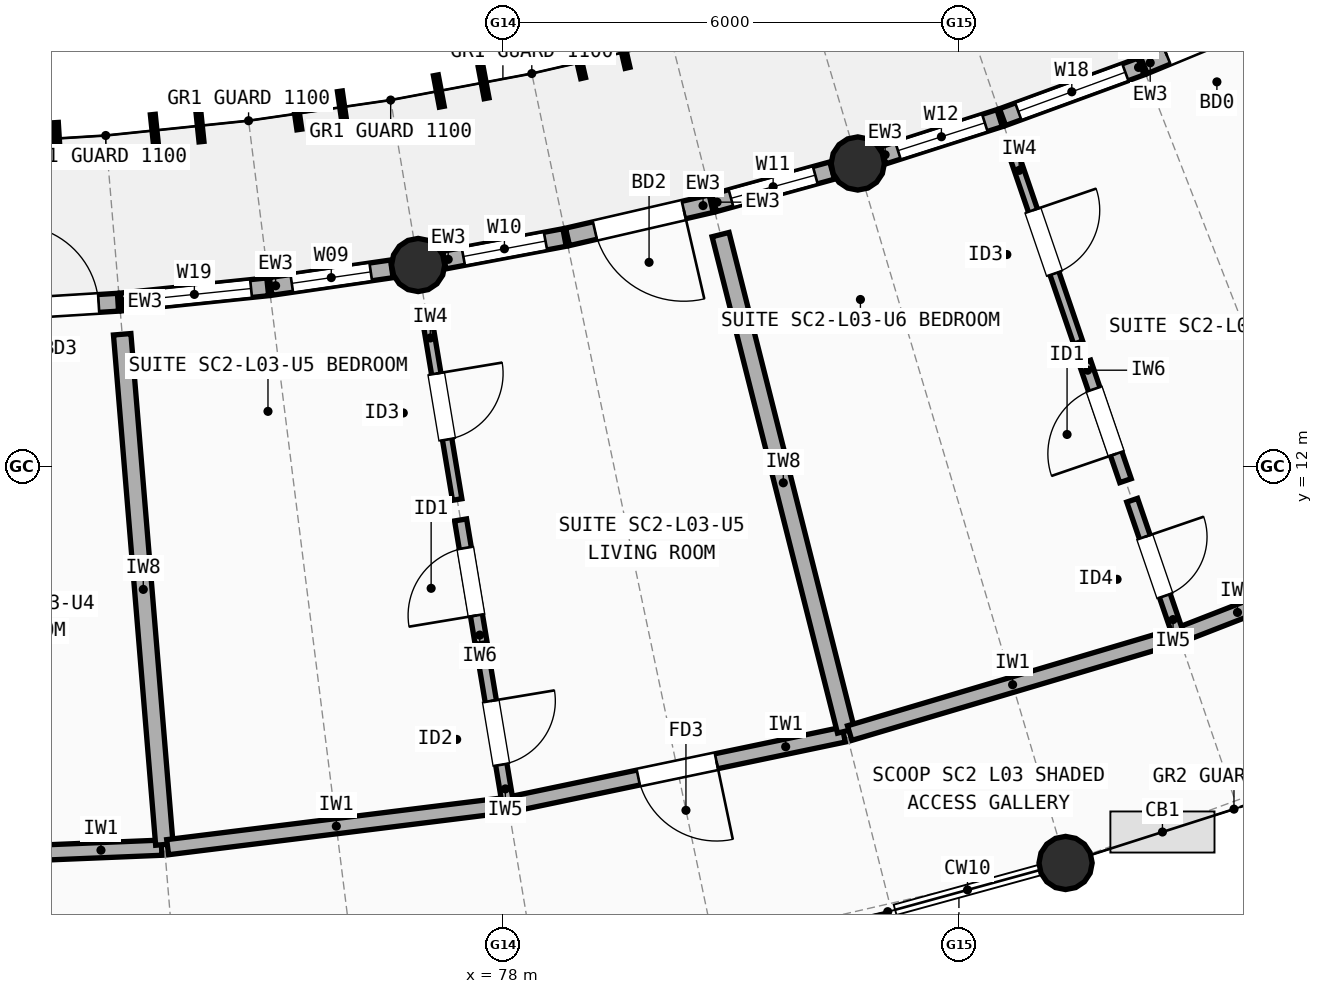
"""IFC4 building model, lengths in metres.
Left out: names, types, materials, properties, quantities, classifications, styles, units other than length and angle.
Written with IfcOpenShell. Run it as: python <this file> out.ifc"""

import sys

from ifc_helpers import new_model, si_unit, direction, frame, frame_2d, origin, origin_2d, place, context, subcontext, project, spatial, rectangle, circle, extrude, element, fill, save


model = new_model("IFC4")
c1 = context("Model", 3, precision=1e-05, world=origin(), true_north=direction((0.0, 1.0)))
c2 = subcontext(c1, "Body", "Model", "MODEL_VIEW")
j1 = project(units=[si_unit("LENGTHUNIT", "METRE"), si_unit("PLANEANGLEUNIT", "RADIAN")], contexts=[c1])
p1 = place(None, origin())
s1 = spatial("IfcSite", under=j1, at=p1, CompositionType="ELEMENT")
p2 = place(p1, origin())
s2 = spatial("IfcBuilding", under=s1, at=p2, CompositionType="ELEMENT")
p3 = place(p2, frame((0.0, 0.0, 10.9)))
s3 = spatial("IfcBuildingStorey", under=s2, at=p3, CompositionType="ELEMENT", Elevation=10.9)
for number, where, z_axis, x_axis in (
    (1, (76.885, 14.652, 0.0), (0.0, 0.0, 1.0), (1.0, 0.0, 0.0)),
    (2, (82.669, 15.988, 0.0), (0.0, 0.0, 1.0), (1.0, 0.0, 0.0)),
    (3, (85.403, 6.785, 0.0), (0.0, 0.0, 1.0), (1.0, 0.0, 0.0)),
):
    element("IfcColumn", number, at=place(p3, frame(where, z_axis=z_axis, x_axis=x_axis)), inside=s3, PredefinedType="COLUMN", context=c2, shape_type="SweptSolid", body=[
        extrude(circle(Radius=0.35, at=origin_2d()), origin(), (0.0, 0.0, 1.0), 2.948),
    ])
p4 = place(p3, frame((71.329, 14.062, 0.0), z_axis=(0.0, 0.0, 1.0), x_axis=(0.998084310064, 0.061868489594, 0.0)))
e4 = element("IfcWall", 4, at=p4, inside=s3, PredefinedType="STANDARD", context=c2, shape_type="SweptSolid", body=[
    extrude(rectangle(XDim=1.61, YDim=0.235, at=frame_2d((0.805, 0.0))), origin(), (0.0, 0.0, 1.0), 2.684),
])
p5 = place(p4, frame((0.255, 0.0, 0.0)))
e5 = element("IfcOpeningElement", 5, at=p5, cuts=e4, PredefinedType="OPENING", context=c2, shape_type="SweptSolid", body=[
    extrude(rectangle(XDim=1.1, YDim=2.15, at=frame_2d((0.55, 1.075))), frame((0.0, 0.127, 0.0), z_axis=(0.0, -1.0, 0.0), x_axis=(1.0, 0.0, 0.0)), (0.0, 0.0, 1.0), 0.255),
])
p6 = place(p3, frame((72.976, 14.165, 0.0), z_axis=(0.0, 0.0, 1.0), x_axis=(0.994688684624, 0.10292920228, 0.0)))
e6 = element("IfcWall", 6, at=p6, inside=s3, PredefinedType="STANDARD", context=c2, shape_type="SweptSolid", body=[
    extrude(rectangle(XDim=1.94, YDim=0.235, at=frame_2d((0.97, 0.0))), origin(), (0.0, 0.0, 1.0), 2.684),
])
p7 = place(p6, frame((0.22, 0.0, 0.85)))
e7 = element("IfcOpeningElement", 7, at=p7, cuts=e6, PredefinedType="OPENING", context=c2, shape_type="SweptSolid", body=[
    extrude(rectangle(XDim=1.5, YDim=1.5, at=frame_2d((0.75, 0.75))), frame((0.0, 0.127, 0.0), z_axis=(0.0, -1.0, 0.0), x_axis=(1.0, 0.0, 0.0)), (0.0, 0.0, 1.0), 0.255),
])
p8 = place(p3, frame((74.945, 14.37, 0.0), z_axis=(0.0, 0.0, 1.0), x_axis=(0.98961312767, 0.143756243492, 0.0)))
e8 = element("IfcWall", 8, at=p8, inside=s3, PredefinedType="STANDARD", context=c2, shape_type="SweptSolid", body=[
    extrude(rectangle(XDim=1.61, YDim=0.235, at=frame_2d((0.805, 0.0))), origin(), (0.0, 0.0, 1.0), 2.684),
])
p9 = place(p8, frame((0.28, 0.0, 0.85)))
e9 = element("IfcOpeningElement", 9, at=p9, cuts=e8, PredefinedType="OPENING", context=c2, shape_type="SweptSolid", body=[
    extrude(rectangle(XDim=1.05, YDim=1.35, at=frame_2d((0.525, 0.675))), frame((0.0, 0.127, 0.0), z_axis=(0.0, -1.0, 0.0), x_axis=(1.0, 0.0, 0.0)), (0.0, 0.0, 1.0), 0.255),
])
p10 = place(p3, frame((77.229, 14.717, 0.0), z_axis=(0.0, 0.0, 1.0), x_axis=(0.982794848755, 0.184700528589, 0.0)))
e10 = element("IfcWall", 10, at=p10, inside=s3, PredefinedType="STANDARD", context=c2, shape_type="SweptSolid", body=[
    extrude(rectangle(XDim=1.61, YDim=0.235, at=frame_2d((0.805, 0.0))), origin(), (0.0, 0.0, 1.0), 2.684),
])
p11 = place(p10, frame((0.255, 0.0, 0.85)))
e11 = element("IfcOpeningElement", 11, at=p11, cuts=e10, PredefinedType="OPENING", context=c2, shape_type="SweptSolid", body=[
    extrude(rectangle(XDim=1.1, YDim=1.45, at=frame_2d((0.55, 0.725))), frame((0.0, 0.127, 0.0), z_axis=(0.0, -1.0, 0.0), x_axis=(1.0, 0.0, 0.0)), (0.0, 0.0, 1.0), 0.255),
])
p12 = place(p3, frame((78.85, 15.022, 0.0), z_axis=(0.0, 0.0, 1.0), x_axis=(0.974359373104, 0.224997360081, 0.0)))
e12 = element("IfcWall", 12, at=p12, inside=s3, PredefinedType="STANDARD", context=c2, shape_type="SweptSolid", body=[
    extrude(rectangle(XDim=1.94, YDim=0.235, at=frame_2d((0.97, 0.0))), origin(), (0.0, 0.0, 1.0), 2.684),
])
p13 = place(p12, frame((0.37, 0.0, 0.0)))
e13 = element("IfcOpeningElement", 13, at=p13, cuts=e12, PredefinedType="OPENING", context=c2, shape_type="SweptSolid", body=[
    extrude(rectangle(XDim=1.2, YDim=2.15, at=frame_2d((0.6, 1.075))), frame((0.0, 0.127, 0.0), z_axis=(0.0, -1.0, 0.0), x_axis=(1.0, 0.0, 0.0)), (0.0, 0.0, 1.0), 0.255),
])
p14 = place(p3, frame((80.779, 15.468, 0.0), z_axis=(0.0, 0.0, 1.0), x_axis=(0.96427223836, 0.264913288318, 0.0)))
e14 = element("IfcWall", 14, at=p14, inside=s3, PredefinedType="STANDARD", context=c2, shape_type="SweptSolid", body=[
    extrude(rectangle(XDim=1.61, YDim=0.235, at=frame_2d((0.805, 0.0))), origin(), (0.0, 0.0, 1.0), 2.684),
])
p15 = place(p14, frame((0.23, 0.0, 0.85)))
e15 = element("IfcOpeningElement", 15, at=p15, cuts=e14, PredefinedType="OPENING", context=c2, shape_type="SweptSolid", body=[
    extrude(rectangle(XDim=1.15, YDim=1.45, at=frame_2d((0.575, 0.725))), frame((0.0, 0.127, 0.0), z_axis=(0.0, -1.0, 0.0), x_axis=(1.0, 0.0, 0.0)), (0.0, 0.0, 1.0), 0.255),
])
p16 = place(p3, frame((83.003, 16.094, 0.0), z_axis=(0.0, 0.0, 1.0), x_axis=(0.952508629145, 0.304511594861, 0.0)))
e16 = element("IfcWall", 16, at=p16, inside=s3, PredefinedType="STANDARD", context=c2, shape_type="SweptSolid", body=[
    extrude(rectangle(XDim=1.61, YDim=0.235, at=frame_2d((0.805, 0.0))), origin(), (0.0, 0.0, 1.0), 2.684),
])
p17 = place(p16, frame((0.205, 0.0, 0.85)))
e17 = element("IfcOpeningElement", 17, at=p17, cuts=e16, PredefinedType="OPENING", context=c2, shape_type="SweptSolid", body=[
    extrude(rectangle(XDim=1.2, YDim=1.35, at=frame_2d((0.6, 0.675))), frame((0.0, 0.127, 0.0), z_axis=(0.0, -1.0, 0.0), x_axis=(1.0, 0.0, 0.0)), (0.0, 0.0, 1.0), 0.255),
])
p18 = place(p3, frame((84.574, 16.597, 0.0), z_axis=(0.0, 0.0, 1.0), x_axis=(0.939178301307, 0.343429932235, 0.0)))
e18 = element("IfcWall", 18, at=p18, inside=s3, PredefinedType="STANDARD", context=c2, shape_type="SweptSolid", body=[
    extrude(rectangle(XDim=1.94, YDim=0.235, at=frame_2d((0.97, 0.0))), origin(), (0.0, 0.0, 1.0), 2.684),
])
p19 = place(p18, frame((0.22, 0.0, 0.85)))
e19 = element("IfcOpeningElement", 19, at=p19, cuts=e18, PredefinedType="OPENING", context=c2, shape_type="SweptSolid", body=[
    extrude(rectangle(XDim=1.5, YDim=1.4, at=frame_2d((0.75, 0.7))), frame((0.0, 0.127, 0.0), z_axis=(0.0, -1.0, 0.0), x_axis=(1.0, 0.0, 0.0)), (0.0, 0.0, 1.0), 0.255),
])
p20 = place(p3, frame((86.433, 17.278, 0.0), z_axis=(0.0, 0.0, 1.0), x_axis=(0.924159027547, 0.382007973481, 0.0)))
e20 = element("IfcWall", 20, at=p20, inside=s3, PredefinedType="STANDARD", context=c2, shape_type="SweptSolid", body=[
    extrude(rectangle(XDim=1.61, YDim=0.235, at=frame_2d((0.805, 0.0))), origin(), (0.0, 0.0, 1.0), 2.684),
])
p21 = place(p20, frame((0.33, 0.0, 0.0)))
e21 = element("IfcOpeningElement", 21, at=p21, cuts=e20, PredefinedType="OPENING", context=c2, shape_type="SweptSolid", body=[
    extrude(rectangle(XDim=0.95, YDim=2.12, at=frame_2d((0.475, 1.06))), frame((0.0, 0.127, 0.0), z_axis=(0.0, -1.0, 0.0), x_axis=(1.0, 0.0, 0.0)), (0.0, 0.0, 1.0), 0.255),
])
p22 = place(p3, frame((69.04, 6.802, 0.0), z_axis=(0.0, 0.0, 1.0), x_axis=(0.999148329529, 0.041262762871, 0.0)))
e22 = element("IfcWall", 22, at=p22, inside=s3, PredefinedType="SOLIDWALL", context=c2, shape_type="SweptSolid", body=[
    extrude(rectangle(XDim=4.473, YDim=0.2, at=frame_2d((2.237, 0.0))), origin(), (0.0, 0.0, 1.0), 2.762),
])
p23 = place(p22, frame((1.747, 0.0, 0.0)))
e23 = element("IfcOpeningElement", 23, at=p23, cuts=e22, PredefinedType="OPENING", context=c2, shape_type="SweptSolid", body=[
    extrude(rectangle(XDim=0.98, YDim=2.15, at=frame_2d((0.49, 1.075))), frame((0.0, 0.11, 0.0), z_axis=(0.0, -1.0, 0.0), x_axis=(1.0, 0.0, 0.0)), (0.0, 0.0, 1.0), 0.22),
])
p24 = place(p3, frame((72.991, 13.741, 0.0), z_axis=(0.0, 0.0, 1.0), x_axis=(0.082418569382, -0.996597802236, 0.0)))
e24 = element("IfcWall", 24, at=p24, inside=s3, PredefinedType="SOLIDWALL", context=c2, shape_type="SweptSolid", body=[
    extrude(rectangle(XDim=6.736, YDim=0.23, at=frame_2d((3.368, 0.0))), origin(), (0.0, 0.0, 1.0), 2.722),
])
p25 = place(p3, frame((73.589, 6.993, 0.0), z_axis=(0.0, 0.0, 1.0), x_axis=(0.992349088432, 0.123463705959, 0.0)))
e25 = element("IfcWall", 25, at=p25, inside=s3, PredefinedType="SOLIDWALL", context=c2, shape_type="SweptSolid", body=[
    extrude(rectangle(XDim=4.473, YDim=0.2, at=frame_2d((2.236, 0.0))), origin(), (0.0, 0.0, 1.0), 2.742),
])
p26 = place(p3, frame((78.107, 7.558, 0.0), z_axis=(0.0, 0.0, 1.0), x_axis=(0.978806148413, 0.204788973894, 0.0)))
e26 = element("IfcWall", 26, at=p26, inside=s3, PredefinedType="SOLIDWALL", context=c2, shape_type="SweptSolid", body=[
    extrude(rectangle(XDim=4.473, YDim=0.2, at=frame_2d((2.236, 0.0))), origin(), (0.0, 0.0, 1.0), 2.722),
])
p27 = place(p26, frame((1.711, 0.0, 0.0)))
e27 = element("IfcOpeningElement", 27, at=p27, cuts=e26, PredefinedType="OPENING", context=c2, shape_type="SweptSolid", body=[
    extrude(rectangle(XDim=1.05, YDim=2.15, at=frame_2d((0.525, 1.075))), frame((0.0, 0.11, 0.0), z_axis=(0.0, -1.0, 0.0), x_axis=(1.0, 0.0, 0.0)), (0.0, 0.0, 1.0), 0.22),
])
p28 = place(p3, frame((76.991, 14.013, 0.0), z_axis=(0.0, 0.0, 1.0), x_axis=(0.16420741421, -0.986425833562, 0.0)))
e28 = element("IfcWall", 28, at=p28, inside=s3, PredefinedType="PARTITIONING", context=c2, shape_type="SweptSolid", body=[
    extrude(rectangle(XDim=2.48, YDim=0.125, at=frame_2d((1.24, 0.0))), origin(), (0.0, 0.0, 1.0), 2.762),
])
p29 = place(p28, frame((0.8, 0.0, 0.0)))
e29 = element("IfcOpeningElement", 29, at=p29, cuts=e28, PredefinedType="OPENING", context=c2, shape_type="SweptSolid", body=[
    extrude(rectangle(XDim=0.88, YDim=2.1, at=frame_2d((0.44, 1.05))), frame((0.0, 0.073, 0.0), z_axis=(0.0, -1.0, 0.0), x_axis=(1.0, 0.0, 0.0)), (0.0, 0.0, 1.0), 0.145),
])
p30 = place(p3, frame((77.443, 11.298, 0.0), z_axis=(0.0, 0.0, 1.0), x_axis=(0.164158726706, -0.986433937193, 0.0)))
e30 = element("IfcWall", 30, at=p30, inside=s3, PredefinedType="PLUMBINGWALL", context=c2, shape_type="SweptSolid", body=[
    extrude(rectangle(XDim=1.648, YDim=0.16, at=frame_2d((0.824, 0.0))), origin(), (0.0, 0.0, 1.0), 2.762),
])
p31 = place(p30, frame((0.374, 0.0, 0.0)))
e31 = element("IfcOpeningElement", 31, at=p31, cuts=e30, PredefinedType="OPENING", context=c2, shape_type="SweptSolid", body=[
    extrude(rectangle(XDim=0.9, YDim=2.1, at=frame_2d((0.45, 1.05))), frame((0.0, 0.09, 0.0), z_axis=(0.0, -1.0, 0.0), x_axis=(1.0, 0.0, 0.0)), (0.0, 0.0, 1.0), 0.18),
])
p32 = place(p3, frame((77.759, 9.404, 0.0), z_axis=(0.0, 0.0, 1.0), x_axis=(0.164269882379, -0.986415432636, 0.0)))
e32 = element("IfcWall", 32, at=p32, inside=s3, PredefinedType="PARTITIONING", context=c2, shape_type="SweptSolid", body=[
    extrude(rectangle(XDim=1.84, YDim=0.15, at=frame_2d((0.92, 0.0))), origin(), (0.0, 0.0, 1.0), 2.762),
])
p33 = place(p32, frame((0.495, 0.0, 0.0)))
e33 = element("IfcOpeningElement", 33, at=p33, cuts=e32, PredefinedType="OPENING", context=c2, shape_type="SweptSolid", body=[
    extrude(rectangle(XDim=0.85, YDim=2.1, at=frame_2d((0.425, 1.05))), frame((0.0, 0.085, 0.0), z_axis=(0.0, -1.0, 0.0), x_axis=(1.0, 0.0, 0.0)), (0.0, 0.0, 1.0), 0.17),
])
p34 = place(p3, frame((80.864, 15.052, 0.0), z_axis=(0.0, 0.0, 1.0), x_axis=(0.244982481903, -0.969527505314, 0.0)))
e34 = element("IfcWall", 34, at=p34, inside=s3, PredefinedType="SOLIDWALL", context=c2, shape_type="SweptSolid", body=[
    extrude(rectangle(XDim=6.736, YDim=0.23, at=frame_2d((3.368, 0.0))), origin(), (0.0, 0.0, 1.0), 2.742),
])
p35 = place(p3, frame((82.562, 8.494, 0.0), z_axis=(0.0, 0.0, 1.0), x_axis=(0.958602413557, 0.28474798107, 0.0)))
e35 = element("IfcWall", 35, at=p35, inside=s3, PredefinedType="SOLIDWALL", context=c2, shape_type="SweptSolid", body=[
    extrude(rectangle(XDim=4.473, YDim=0.2, at=frame_2d((2.236, 0.0))), origin(), (0.0, 0.0, 1.0), 2.762),
])
p36 = place(p3, frame((86.926, 9.793, 0.0), z_axis=(0.0, 0.0, 1.0), x_axis=(0.931847867525, 0.362849213571, 0.0)))
e36 = element("IfcWall", 36, at=p36, inside=s3, PredefinedType="SOLIDWALL", context=c2, shape_type="SweptSolid", body=[
    extrude(rectangle(XDim=4.473, YDim=0.2, at=frame_2d((2.237, 0.0))), origin(), (0.0, 0.0, 1.0), 2.742),
])
p37 = place(p36, frame((1.737, 0.0, 0.0)))
e37 = element("IfcOpeningElement", 37, at=p37, cuts=e36, PredefinedType="OPENING", context=c2, shape_type="SweptSolid", body=[
    extrude(rectangle(XDim=1.0, YDim=2.15, at=frame_2d((0.5, 1.075))), frame((0.0, 0.11, 0.0), z_axis=(0.0, -1.0, 0.0), x_axis=(1.0, 0.0, 0.0)), (0.0, 0.0, 1.0), 0.22),
])
p38 = place(p3, frame((84.662, 16.28, 0.0), z_axis=(0.0, 0.0, 1.0), x_axis=(0.32401221778, -0.94605289637, 0.0)))
e38 = element("IfcWall", 38, at=p38, inside=s3, PredefinedType="PARTITIONING", context=c2, shape_type="SweptSolid", body=[
    extrude(rectangle(XDim=2.8, YDim=0.125, at=frame_2d((1.4, 0.0))), origin(), (0.0, 0.0, 1.0), 2.722),
])
p39 = place(p38, frame((0.96, 0.0, 0.0)))
e39 = element("IfcOpeningElement", 39, at=p39, cuts=e38, PredefinedType="OPENING", context=c2, shape_type="SweptSolid", body=[
    extrude(rectangle(XDim=0.88, YDim=2.1, at=frame_2d((0.44, 1.05))), frame((0.0, 0.073, 0.0), z_axis=(0.0, -1.0, 0.0), x_axis=(1.0, 0.0, 0.0)), (0.0, 0.0, 1.0), 0.145),
])
p40 = place(p3, frame((85.657, 13.374, 0.0), z_axis=(0.0, 0.0, 1.0), x_axis=(0.324127376206, -0.946013448104, 0.0)))
e40 = element("IfcWall", 40, at=p40, inside=s3, PredefinedType="PLUMBINGWALL", context=c2, shape_type="SweptSolid", body=[
    extrude(rectangle(XDim=1.648, YDim=0.16, at=frame_2d((0.824, 0.0))), origin(), (0.0, 0.0, 1.0), 2.722),
])
p41 = place(p40, frame((0.374, 0.0, 0.0)))
e41 = element("IfcOpeningElement", 41, at=p41, cuts=e40, PredefinedType="OPENING", context=c2, shape_type="SweptSolid", body=[
    extrude(rectangle(XDim=0.9, YDim=2.1, at=frame_2d((0.45, 1.05))), frame((0.0, 0.09, 0.0), z_axis=(0.0, -1.0, 0.0), x_axis=(1.0, 0.0, 0.0)), (0.0, 0.0, 1.0), 0.18),
])
p42 = place(p3, frame((86.279, 11.558, 0.0), z_axis=(0.0, 0.0, 1.0), x_axis=(0.323978335312, -0.946064500046, 0.0)))
e42 = element("IfcWall", 42, at=p42, inside=s3, PredefinedType="PARTITIONING", context=c2, shape_type="SweptSolid", body=[
    extrude(rectangle(XDim=1.84, YDim=0.15, at=frame_2d((0.92, 0.0))), origin(), (0.0, 0.0, 1.0), 2.722),
])
p43 = place(p42, frame((0.51, 0.0, 0.0)))
e43 = element("IfcOpeningElement", 43, at=p43, cuts=e42, PredefinedType="OPENING", context=c2, shape_type="SweptSolid", body=[
    extrude(rectangle(XDim=0.82, YDim=2.08, at=frame_2d((0.41, 1.04))), frame((0.0, 0.085, 0.0), z_axis=(0.0, -1.0, 0.0), x_axis=(1.0, 0.0, 0.0)), (0.0, 0.0, 1.0), 0.17),
])
p44 = place(p5, origin())
e44 = element("IfcDoor", 44, at=p44, inside=s3, OperationType="SINGLE_SWING_LEFT", PredefinedType="DOOR", context=c2, shape_type="SweptSolid", body=[
    extrude(rectangle(XDim=1.1, YDim=2.15, at=frame_2d((0.55, 1.075))), frame((0.0, 0.025, 0.0), z_axis=(0.0, -1.0, 0.0), x_axis=(1.0, 0.0, 0.0)), (0.0, 0.0, 1.0), 0.05),
])
fill(e5, e44)
p45 = place(p7, origin())
e45 = element("IfcWindow", 45, at=p45, inside=s3, PartitioningType="SINGLE_PANEL", PredefinedType="WINDOW", context=c2, shape_type="SweptSolid", body=[
    extrude(rectangle(XDim=1.5, YDim=1.5, at=frame_2d((0.75, 0.75))), frame((0.0, 0.03, 0.0), z_axis=(0.0, -1.0, 0.0), x_axis=(1.0, 0.0, 0.0)), (0.0, 0.0, 1.0), 0.06),
])
fill(e7, e45)
p46 = place(p9, origin())
e46 = element("IfcWindow", 46, at=p46, inside=s3, PartitioningType="SINGLE_PANEL", PredefinedType="WINDOW", context=c2, shape_type="SweptSolid", body=[
    extrude(rectangle(XDim=1.05, YDim=1.35, at=frame_2d((0.525, 0.675))), frame((0.0, 0.03, 0.0), z_axis=(0.0, -1.0, 0.0), x_axis=(1.0, 0.0, 0.0)), (0.0, 0.0, 1.0), 0.06),
])
fill(e9, e46)
p47 = place(p11, origin())
e47 = element("IfcWindow", 47, at=p47, inside=s3, PartitioningType="SINGLE_PANEL", PredefinedType="WINDOW", context=c2, shape_type="SweptSolid", body=[
    extrude(rectangle(XDim=1.1, YDim=1.45, at=frame_2d((0.55, 0.725))), frame((0.0, 0.03, 0.0), z_axis=(0.0, -1.0, 0.0), x_axis=(1.0, 0.0, 0.0)), (0.0, 0.0, 1.0), 0.06),
])
fill(e11, e47)
p48 = place(p13, origin())
e48 = element("IfcDoor", 48, at=p48, inside=s3, OperationType="SINGLE_SWING_RIGHT", PredefinedType="DOOR", context=c2, shape_type="SweptSolid", body=[
    extrude(rectangle(XDim=1.2, YDim=2.15, at=frame_2d((0.6, 1.075))), frame((0.0, 0.025, 0.0), z_axis=(0.0, -1.0, 0.0), x_axis=(1.0, 0.0, 0.0)), (0.0, 0.0, 1.0), 0.05),
])
fill(e13, e48)
p49 = place(p15, origin())
e49 = element("IfcWindow", 49, at=p49, inside=s3, PartitioningType="SINGLE_PANEL", PredefinedType="WINDOW", context=c2, shape_type="SweptSolid", body=[
    extrude(rectangle(XDim=1.15, YDim=1.45, at=frame_2d((0.575, 0.725))), frame((0.0, 0.03, 0.0), z_axis=(0.0, -1.0, 0.0), x_axis=(1.0, 0.0, 0.0)), (0.0, 0.0, 1.0), 0.06),
])
fill(e15, e49)
p50 = place(p17, origin())
e50 = element("IfcWindow", 50, at=p50, inside=s3, PartitioningType="SINGLE_PANEL", PredefinedType="WINDOW", context=c2, shape_type="SweptSolid", body=[
    extrude(rectangle(XDim=1.2, YDim=1.35, at=frame_2d((0.6, 0.675))), frame((0.0, 0.03, 0.0), z_axis=(0.0, -1.0, 0.0), x_axis=(1.0, 0.0, 0.0)), (0.0, 0.0, 1.0), 0.06),
])
fill(e17, e50)
p51 = place(p19, origin())
e51 = element("IfcWindow", 51, at=p51, inside=s3, PartitioningType="SINGLE_PANEL", PredefinedType="WINDOW", context=c2, shape_type="SweptSolid", body=[
    extrude(rectangle(XDim=1.5, YDim=1.4, at=frame_2d((0.75, 0.7))), frame((0.0, 0.03, 0.0), z_axis=(0.0, -1.0, 0.0), x_axis=(1.0, 0.0, 0.0)), (0.0, 0.0, 1.0), 0.06),
])
fill(e19, e51)
p52 = place(p21, origin())
e52 = element("IfcDoor", 52, at=p52, inside=s3, OperationType="SINGLE_SWING_LEFT", PredefinedType="DOOR", context=c2, shape_type="SweptSolid", body=[
    extrude(rectangle(XDim=0.95, YDim=2.12, at=frame_2d((0.475, 1.06))), frame((0.0, 0.025, 0.0), z_axis=(0.0, -1.0, 0.0), x_axis=(1.0, 0.0, 0.0)), (0.0, 0.0, 1.0), 0.05),
])
fill(e21, e52)
p53 = place(p27, origin())
e53 = element("IfcDoor", 53, at=p53, inside=s3, OperationType="SINGLE_SWING_RIGHT", PredefinedType="DOOR", context=c2, shape_type="SweptSolid", body=[
    extrude(rectangle(XDim=1.05, YDim=2.15, at=frame_2d((0.525, 1.075))), frame((0.0, 0.025, 0.0), z_axis=(0.0, -1.0, 0.0), x_axis=(1.0, 0.0, 0.0)), (0.0, 0.0, 1.0), 0.05),
])
fill(e27, e53)
p54 = place(p29, origin())
e54 = element("IfcDoor", 54, at=p54, inside=s3, OperationType="SINGLE_SWING_LEFT", PredefinedType="DOOR", context=c2, shape_type="SweptSolid", body=[
    extrude(rectangle(XDim=0.88, YDim=2.1, at=frame_2d((0.44, 1.05))), frame((0.0, 0.025, 0.0), z_axis=(0.0, -1.0, 0.0), x_axis=(1.0, 0.0, 0.0)), (0.0, 0.0, 1.0), 0.05),
])
fill(e29, e54)
p55 = place(p31, origin())
e55 = element("IfcDoor", 55, at=p55, inside=s3, OperationType="SINGLE_SWING_RIGHT", PredefinedType="DOOR", context=c2, shape_type="SweptSolid", body=[
    extrude(rectangle(XDim=0.9, YDim=2.1, at=frame_2d((0.45, 1.05))), frame((0.0, 0.025, 0.0), z_axis=(0.0, -1.0, 0.0), x_axis=(1.0, 0.0, 0.0)), (0.0, 0.0, 1.0), 0.05),
])
fill(e31, e55)
p56 = place(p33, origin())
e56 = element("IfcDoor", 56, at=p56, inside=s3, OperationType="SINGLE_SWING_LEFT", PredefinedType="DOOR", context=c2, shape_type="SweptSolid", body=[
    extrude(rectangle(XDim=0.85, YDim=2.1, at=frame_2d((0.425, 1.05))), frame((0.0, 0.025, 0.0), z_axis=(0.0, -1.0, 0.0), x_axis=(1.0, 0.0, 0.0)), (0.0, 0.0, 1.0), 0.05),
])
fill(e33, e56)
p57 = place(p39, origin())
e57 = element("IfcDoor", 57, at=p57, inside=s3, OperationType="SINGLE_SWING_LEFT", PredefinedType="DOOR", context=c2, shape_type="SweptSolid", body=[
    extrude(rectangle(XDim=0.88, YDim=2.1, at=frame_2d((0.44, 1.05))), frame((0.0, 0.025, 0.0), z_axis=(0.0, -1.0, 0.0), x_axis=(1.0, 0.0, 0.0)), (0.0, 0.0, 1.0), 0.05),
])
fill(e39, e57)
p58 = place(p41, origin())
e58 = element("IfcDoor", 58, at=p58, inside=s3, OperationType="SINGLE_SWING_RIGHT", PredefinedType="DOOR", context=c2, shape_type="SweptSolid", body=[
    extrude(rectangle(XDim=0.9, YDim=2.1, at=frame_2d((0.45, 1.05))), frame((0.0, 0.025, 0.0), z_axis=(0.0, -1.0, 0.0), x_axis=(1.0, 0.0, 0.0)), (0.0, 0.0, 1.0), 0.05),
])
fill(e41, e58)
p59 = place(p43, origin())
e59 = element("IfcDoor", 59, at=p59, inside=s3, OperationType="SINGLE_SWING_LEFT", PredefinedType="DOOR", context=c2, shape_type="SweptSolid", body=[
    extrude(rectangle(XDim=0.82, YDim=2.08, at=frame_2d((0.41, 1.04))), frame((0.0, 0.025, 0.0), z_axis=(0.0, -1.0, 0.0), x_axis=(1.0, 0.0, 0.0)), (0.0, 0.0, 1.0), 0.05),
])
fill(e43, e59)
save(model, sys.argv[1])
